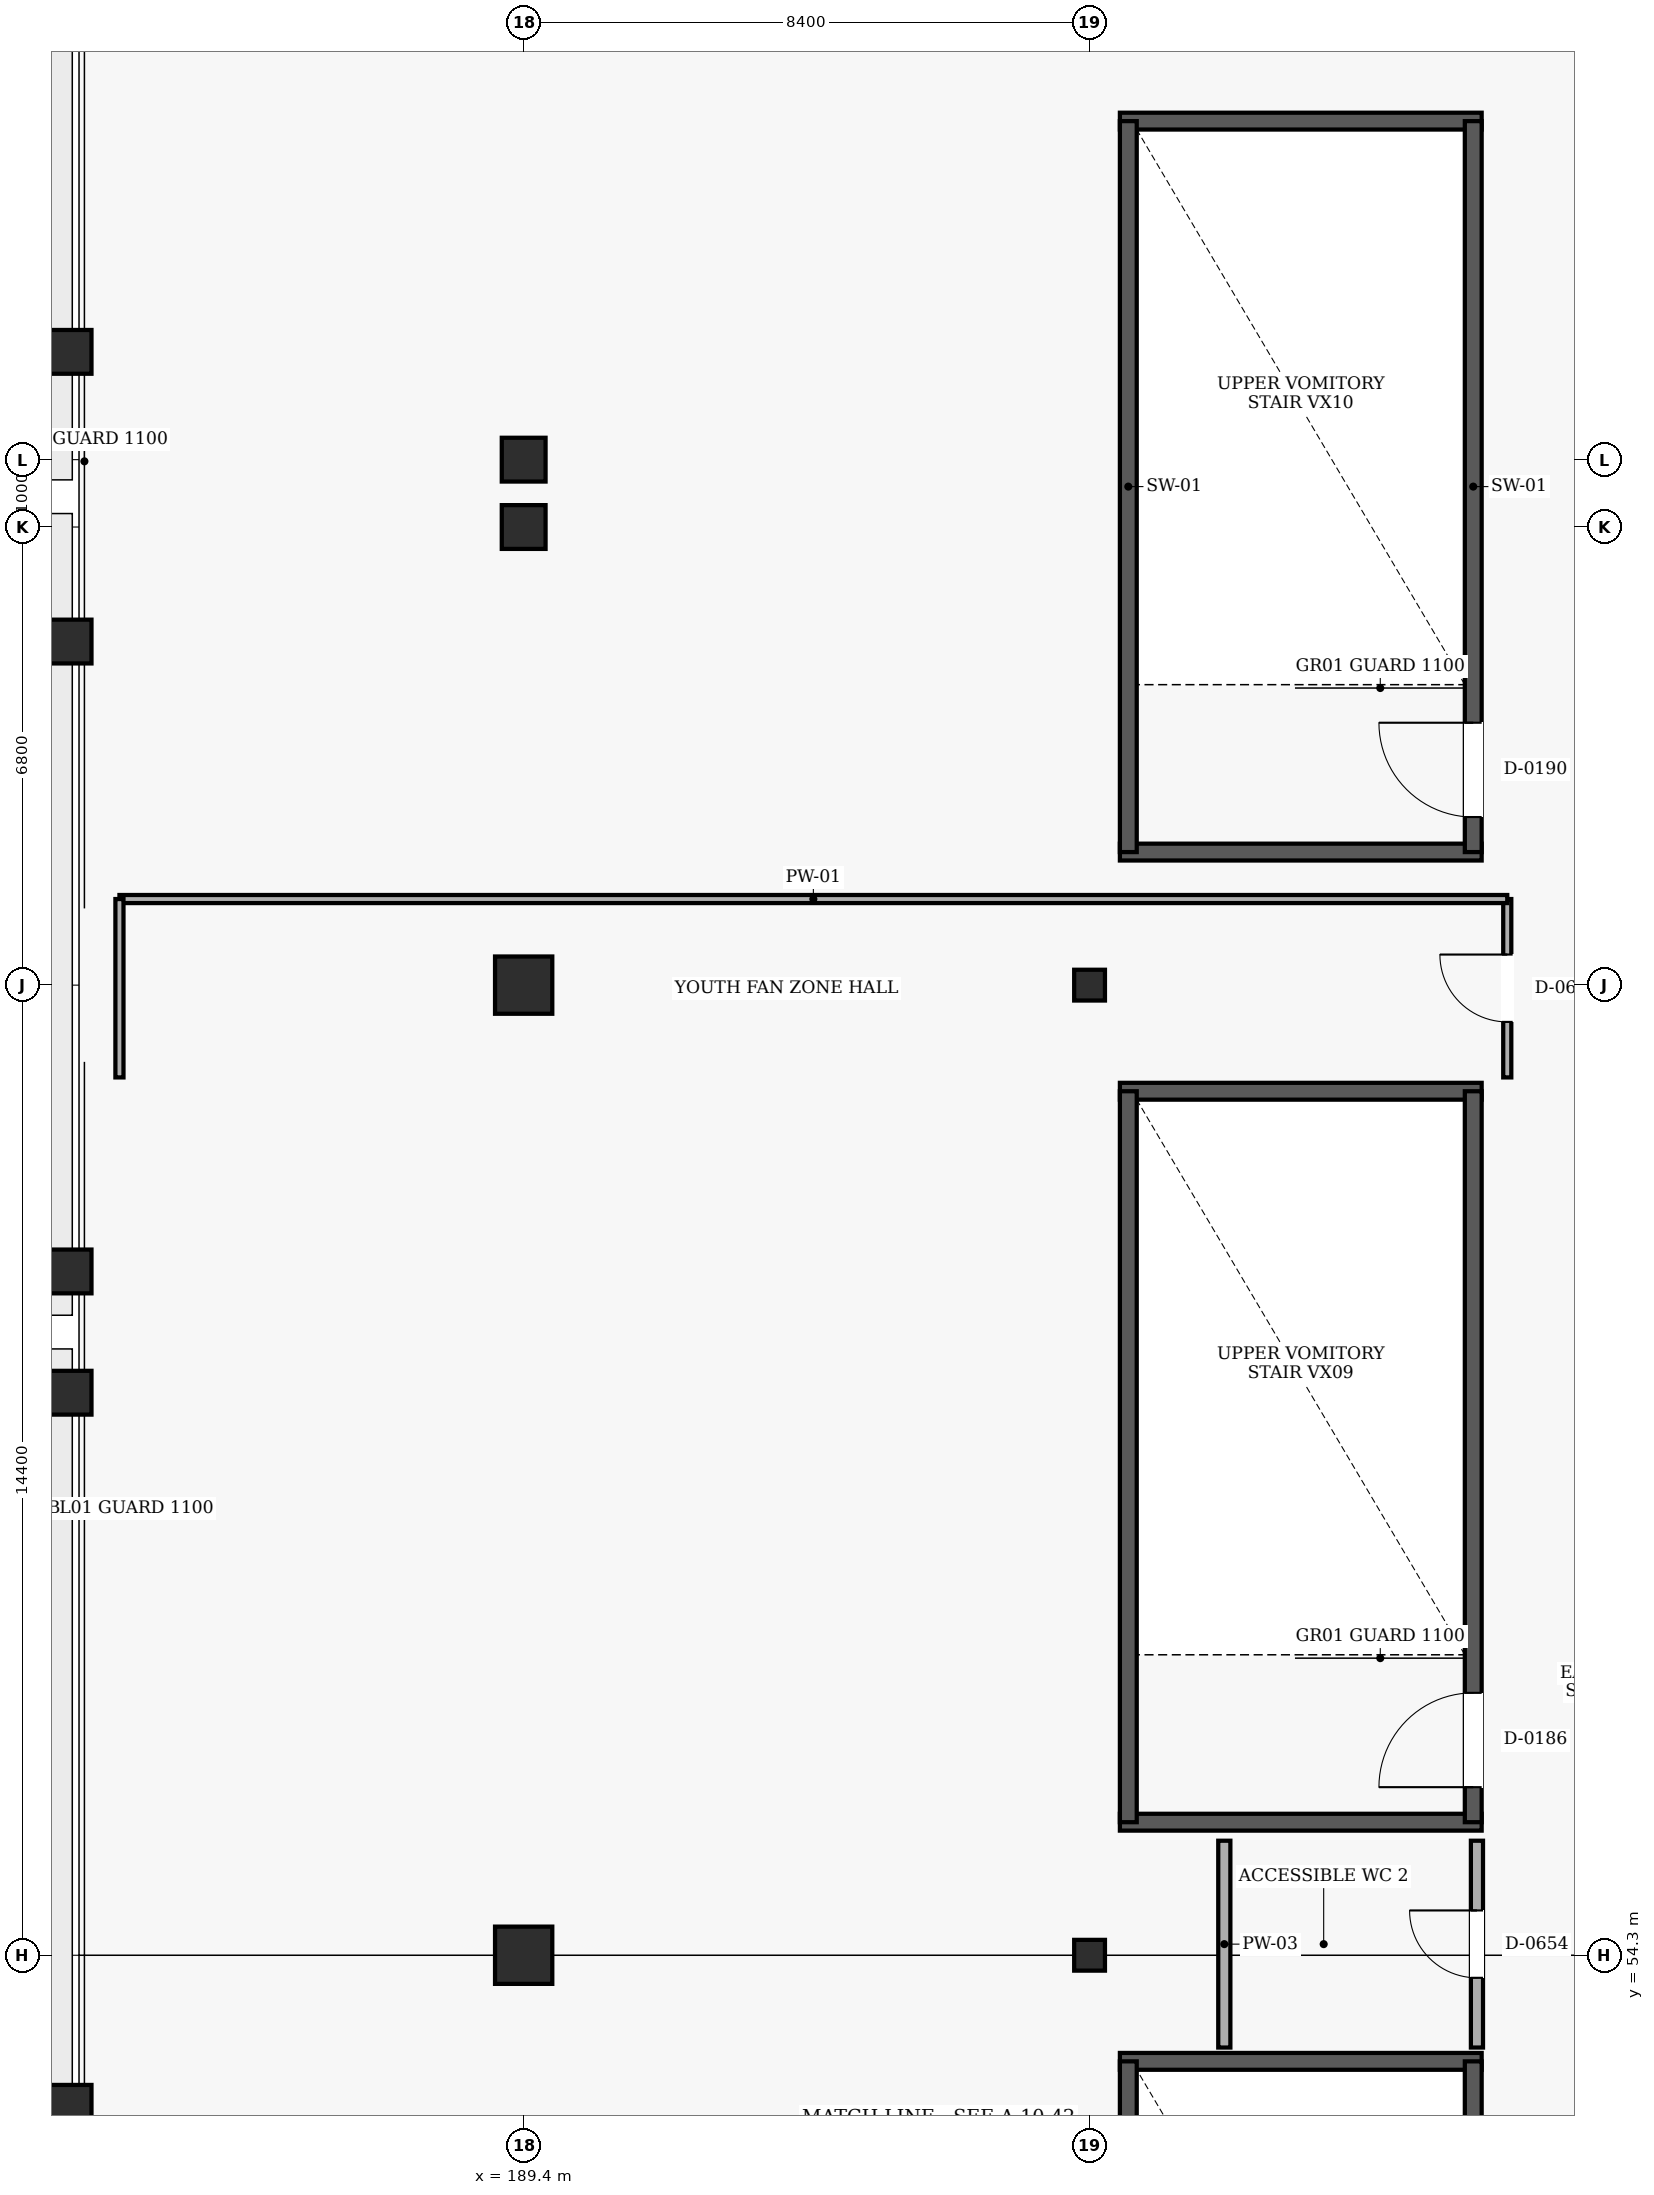
"""IFC4 building model, lengths in metres.
Left out: names, types, materials, properties, quantities, classifications, styles, units other than length and angle.
Written with IfcOpenShell. Run it as: python <this file> out.ifc"""

import sys

from ifc_helpers import new_model, si_unit, direction, frame, frame_2d, origin, origin_2d, place, context, subcontext, project, spatial, rectangle, hollow_circle, extrude, element, fill, save


model = new_model("IFC4")
c1 = context("Model", 3, precision=1e-05, world=origin(), true_north=direction((0.0, 1.0)))
c2 = subcontext(c1, "Body", "Model", "MODEL_VIEW")
j1 = project(units=[si_unit("LENGTHUNIT", "METRE"), si_unit("PLANEANGLEUNIT", "RADIAN")], contexts=[c1])
p1 = place(None, origin())
s1 = spatial("IfcSite", under=j1, at=p1, CompositionType="ELEMENT")
p2 = place(p1, origin())
s2 = spatial("IfcBuilding", under=s1, at=p2, CompositionType="ELEMENT")
p3 = place(p2, frame((0.0, 0.0, 15.0)))
s3 = spatial("IfcBuildingStorey", under=s2, at=p3, CompositionType="ELEMENT", Elevation=15.0)
for number, where, z_axis, x_axis in (
    (1, (189.4, 54.3, 0.0), (0.0, 0.0, 1.0), (1.0, 0.0, 0.0)),
    (2, (189.4, 68.7, 0.0), (0.0, 0.0, 1.0), (1.0, 0.0, 0.0)),
):
    element("IfcColumn", number, at=place(p3, frame(where, z_axis=z_axis, x_axis=x_axis)), inside=s3, PredefinedType="COLUMN", context=c2, shape_type="SweptSolid", body=[
        extrude(rectangle(XDim=0.85, YDim=0.85, at=origin_2d()), origin(), (0.0, 0.0, 1.0), 4.8),
    ])
for number, where, z_axis, x_axis in (
    (3, (189.4, 75.5, 0.0), (0.0, 0.0, 1.0), (1.0, 0.0, 0.0)),
    (4, (189.4, 76.5, 0.0), (0.0, 0.0, 1.0), (1.0, 0.0, 0.0)),
):
    element("IfcColumn", number, at=place(p3, frame(where, z_axis=z_axis, x_axis=x_axis)), inside=s3, PredefinedType="COLUMN", context=c2, shape_type="SweptSolid", body=[
        extrude(rectangle(XDim=0.65, YDim=0.65, at=origin_2d()), origin(), (0.0, 0.0, 1.0), 4.8),
    ])
for number, where, z_axis, x_axis in (
    (5, (197.8, 54.3, 0.0), (0.0, 0.0, 1.0), (1.0, 0.0, 0.0)),
    (6, (197.8, 68.7, 0.0), (0.0, 0.0, 1.0), (1.0, 0.0, 0.0)),
):
    element("IfcColumn", number, at=place(p3, frame(where, z_axis=z_axis, x_axis=x_axis)), inside=s3, PredefinedType="COLUMN", context=c2, shape_type="SweptSolid", body=[
        extrude(hollow_circle(Radius=0.229, WallThickness=0.02, at=origin_2d()), origin(), (0.0, 0.0, 1.0), 4.8),
    ])
for number, where, z_axis, x_axis in (
    (7, (182.66, 52.05, 0.0), (0.0, 0.0, 1.0), (1.0, 0.0, 0.0)),
    (8, (182.66, 62.65, 0.0), (0.0, 0.0, 1.0), (1.0, 0.0, 0.0)),
    (9, (182.66, 64.45, 0.0), (0.0, 0.0, 1.0), (1.0, 0.0, 0.0)),
    (10, (182.66, 73.8, 0.0), (0.0, 0.0, 1.0), (1.0, 0.0, 0.0)),
    (11, (182.66, 78.1, 0.0), (0.0, 0.0, 1.0), (1.0, 0.0, 0.0)),
):
    element("IfcColumn", number, at=place(p3, frame(where, z_axis=z_axis, x_axis=x_axis)), inside=s3, PredefinedType="COLUMN", context=c2, shape_type="SweptSolid", body=[
        extrude(rectangle(XDim=0.65, YDim=0.65, at=origin_2d()), origin(), (0.0, 0.0, 1.0), 2.188),
    ])
p4 = place(p3, frame((203.62, 52.725, 0.0), z_axis=(0.0, 0.0, 1.0), x_axis=(-1.0, 0.0, 0.0)))
e12 = element("IfcWall", 12, at=p4, inside=s3, PredefinedType="SHEAR", context=c2, shape_type="SweptSolid", body=[
    extrude(rectangle(XDim=5.37, YDim=0.25, at=frame_2d((2.685, 0.0))), origin(), (0.0, 0.0, 1.0), 4.5),
])
p5 = place(p3, frame((198.375, 41.875, 0.0), z_axis=(0.0, 0.0, 1.0), x_axis=(0.0, 1.0, 0.0)))
e13 = element("IfcWall", 13, at=p5, inside=s3, PredefinedType="SHEAR", context=c2, shape_type="SweptSolid", body=[
    extrude(rectangle(XDim=10.85, YDim=0.25, at=frame_2d((5.425, 0.0))), origin(), (0.0, 0.0, 1.0), 4.5),
])
p6 = place(p3, frame((203.495, 41.875, 0.0), z_axis=(0.0, 0.0, 1.0), x_axis=(0.0, 1.0, 0.0)))
e14 = element("IfcWall", 14, at=p6, inside=s3, PredefinedType="SHEAR", context=c2, shape_type="SweptSolid", body=[
    extrude(rectangle(XDim=10.85, YDim=0.25, at=frame_2d((5.425, 0.0))), origin(), (0.0, 0.0, 1.0), 4.5),
])
p7 = place(p6, frame((0.52, 0.0, 0.0)))
e15 = element("IfcOpeningElement", 15, at=p7, cuts=e14, PredefinedType="OPENING", context=c2, shape_type="SweptSolid", body=[
    extrude(rectangle(XDim=1.4, YDim=2.15, at=frame_2d((0.7, 1.075))), frame((0.0, 0.135, 0.0), z_axis=(0.0, -1.0, 0.0), x_axis=(1.0, 0.0, 0.0)), (0.0, 0.0, 1.0), 0.27),
])
for number, where, z_axis, x_axis in (
    (16, (198.25, 56.275, 0.0), (0.0, 0.0, 1.0), (1.0, 0.0, 0.0)),
    (17, (203.62, 67.125, 0.0), (0.0, 0.0, 1.0), (-1.0, 0.0, 0.0)),
):
    element("IfcWall", number, at=place(p3, frame(where, z_axis=z_axis, x_axis=x_axis)), inside=s3, PredefinedType="SHEAR", context=c2, shape_type="SweptSolid", body=[
        extrude(rectangle(XDim=5.37, YDim=0.25, at=frame_2d((2.685, 0.0))), origin(), (0.0, 0.0, 1.0), 4.5),
    ])
p8 = place(p3, frame((198.375, 56.275, 0.0), z_axis=(0.0, 0.0, 1.0), x_axis=(0.0, 1.0, 0.0)))
e18 = element("IfcWall", 18, at=p8, inside=s3, PredefinedType="SHEAR", context=c2, shape_type="SweptSolid", body=[
    extrude(rectangle(XDim=10.85, YDim=0.25, at=frame_2d((5.425, 0.0))), origin(), (0.0, 0.0, 1.0), 4.5),
])
p9 = place(p3, frame((203.495, 56.275, 0.0), z_axis=(0.0, 0.0, 1.0), x_axis=(0.0, 1.0, 0.0)))
e19 = element("IfcWall", 19, at=p9, inside=s3, PredefinedType="SHEAR", context=c2, shape_type="SweptSolid", body=[
    extrude(rectangle(XDim=10.85, YDim=0.25, at=frame_2d((5.425, 0.0))), origin(), (0.0, 0.0, 1.0), 4.5),
])
p10 = place(p9, frame((0.52, 0.0, 0.0)))
e20 = element("IfcOpeningElement", 20, at=p10, cuts=e19, PredefinedType="OPENING", context=c2, shape_type="SweptSolid", body=[
    extrude(rectangle(XDim=1.4, YDim=2.15, at=frame_2d((0.7, 1.075))), frame((0.0, 0.135, 0.0), z_axis=(0.0, -1.0, 0.0), x_axis=(1.0, 0.0, 0.0)), (0.0, 0.0, 1.0), 0.27),
])
for number, where, z_axis, x_axis in (
    (21, (198.25, 70.675, 0.0), (0.0, 0.0, 1.0), (1.0, 0.0, 0.0)),
    (22, (203.62, 81.525, 0.0), (0.0, 0.0, 1.0), (-1.0, 0.0, 0.0)),
):
    element("IfcWall", number, at=place(p3, frame(where, z_axis=z_axis, x_axis=x_axis)), inside=s3, PredefinedType="SHEAR", context=c2, shape_type="SweptSolid", body=[
        extrude(rectangle(XDim=5.37, YDim=0.25, at=frame_2d((2.685, 0.0))), origin(), (0.0, 0.0, 1.0), 4.5),
    ])
p11 = place(p3, frame((198.375, 70.675, 0.0), z_axis=(0.0, 0.0, 1.0), x_axis=(0.0, 1.0, 0.0)))
e23 = element("IfcWall", 23, at=p11, inside=s3, PredefinedType="SHEAR", context=c2, shape_type="SweptSolid", body=[
    extrude(rectangle(XDim=10.85, YDim=0.25, at=frame_2d((5.425, 0.0))), origin(), (0.0, 0.0, 1.0), 4.5),
])
p12 = place(p3, frame((203.495, 70.675, 0.0), z_axis=(0.0, 0.0, 1.0), x_axis=(0.0, 1.0, 0.0)))
e24 = element("IfcWall", 24, at=p12, inside=s3, PredefinedType="SHEAR", context=c2, shape_type="SweptSolid", body=[
    extrude(rectangle(XDim=10.85, YDim=0.25, at=frame_2d((5.425, 0.0))), origin(), (0.0, 0.0, 1.0), 4.5),
])
p13 = place(p12, frame((0.52, 0.0, 0.0)))
e25 = element("IfcOpeningElement", 25, at=p13, cuts=e24, PredefinedType="OPENING", context=c2, shape_type="SweptSolid", body=[
    extrude(rectangle(XDim=1.4, YDim=2.15, at=frame_2d((0.7, 1.075))), frame((0.0, 0.135, 0.0), z_axis=(0.0, -1.0, 0.0), x_axis=(1.0, 0.0, 0.0)), (0.0, 0.0, 1.0), 0.27),
])
p14 = place(p3, frame((203.55, 52.93, 0.0), z_axis=(0.0, 0.0, 1.0), x_axis=(0.0, 1.0, 0.0)))
e26 = element("IfcWall", 26, at=p14, inside=s3, PredefinedType="PARTITIONING", context=c2, shape_type="SweptSolid", body=[
    extrude(rectangle(XDim=3.07, YDim=0.18, at=frame_2d((1.535, 0.0))), origin(), (0.0, 0.0, 1.0), 4.5),
])
p15 = place(p14, frame((1.035, 0.0, 0.0)))
e27 = element("IfcOpeningElement", 27, at=p15, cuts=e26, PredefinedType="OPENING", context=c2, shape_type="SweptSolid", body=[
    extrude(rectangle(XDim=1.0, YDim=2.1, at=frame_2d((0.5, 1.05))), frame((0.0, 0.1, 0.0), z_axis=(0.0, -1.0, 0.0), x_axis=(1.0, 0.0, 0.0)), (0.0, 0.0, 1.0), 0.2),
])
p16 = place(p3, frame((199.8, 56.0, 0.0), z_axis=(0.0, 0.0, 1.0), x_axis=(0.0, -1.0, 0.0)))
e28 = element("IfcWall", 28, at=p16, inside=s3, PredefinedType="PARTITIONING", context=c2, shape_type="SweptSolid", body=[
    extrude(rectangle(XDim=3.07, YDim=0.18, at=frame_2d((1.535, 0.0))), origin(), (0.0, 0.0, 1.0), 4.5),
])
p17 = place(p3, frame((204.0, 67.33, 0.0), z_axis=(0.0, 0.0, 1.0), x_axis=(0.0, 1.0, 0.0)))
e29 = element("IfcWall", 29, at=p17, inside=s3, PredefinedType="PARTITIONING", context=c2, shape_type="SweptSolid", body=[
    extrude(rectangle(XDim=2.648, YDim=0.12, at=frame_2d((1.324, 0.0))), origin(), (0.0, 0.0, 1.0), 4.5),
])
p18 = place(p17, frame((0.824, 0.0, 0.0)))
e30 = element("IfcOpeningElement", 30, at=p18, cuts=e29, PredefinedType="OPENING", context=c2, shape_type="SweptSolid", body=[
    extrude(rectangle(XDim=1.0, YDim=2.1, at=frame_2d((0.5, 1.05))), frame((0.0, 0.07, 0.0), z_axis=(0.0, -1.0, 0.0), x_axis=(1.0, 0.0, 0.0)), (0.0, 0.0, 1.0), 0.14),
])
p19 = place(p3, frame((204.0, 69.978, 0.0), z_axis=(0.0, 0.0, 1.0), x_axis=(-1.0, 0.0, 0.0)))
e31 = element("IfcWall", 31, at=p19, inside=s3, PredefinedType="PARTITIONING", context=c2, shape_type="SweptSolid", body=[
    extrude(rectangle(XDim=20.6, YDim=0.12, at=frame_2d((10.3, 0.0))), origin(), (0.0, 0.0, 1.0), 4.5),
])
p20 = place(p3, frame((183.4, 69.978, 0.0), z_axis=(0.0, 0.0, 1.0), x_axis=(0.0, -1.0, 0.0)))
e32 = element("IfcWall", 32, at=p20, inside=s3, PredefinedType="PARTITIONING", context=c2, shape_type="SweptSolid", body=[
    extrude(rectangle(XDim=2.648, YDim=0.12, at=frame_2d((1.324, 0.0))), origin(), (0.0, 0.0, 1.0), 4.5),
])
p21 = place(p10, origin())
e33 = element("IfcDoor", 33, at=p21, inside=s3, OperationType="SINGLE_SWING_LEFT", PredefinedType="DOOR", context=c2, shape_type="SweptSolid", body=[
    extrude(rectangle(XDim=1.4, YDim=2.15, at=frame_2d((0.7, 1.075))), frame((0.0, 0.025, 0.0), z_axis=(0.0, -1.0, 0.0), x_axis=(1.0, 0.0, 0.0)), (0.0, 0.0, 1.0), 0.05),
])
fill(e20, e33)
p22 = place(p13, origin())
e34 = element("IfcDoor", 34, at=p22, inside=s3, OperationType="SINGLE_SWING_RIGHT", PredefinedType="DOOR", context=c2, shape_type="SweptSolid", body=[
    extrude(rectangle(XDim=1.4, YDim=2.15, at=frame_2d((0.7, 1.075))), frame((0.0, 0.025, 0.0), z_axis=(0.0, -1.0, 0.0), x_axis=(1.0, 0.0, 0.0)), (0.0, 0.0, 1.0), 0.05),
])
fill(e25, e34)
p23 = place(p15, origin())
e35 = element("IfcDoor", 35, at=p23, inside=s3, OperationType="SINGLE_SWING_RIGHT", PredefinedType="DOOR", context=c2, shape_type="SweptSolid", body=[
    extrude(rectangle(XDim=1.0, YDim=2.1, at=frame_2d((0.5, 1.05))), frame((0.0, 0.025, 0.0), z_axis=(0.0, -1.0, 0.0), x_axis=(1.0, 0.0, 0.0)), (0.0, 0.0, 1.0), 0.05),
])
fill(e27, e35)
p24 = place(p18, origin())
e36 = element("IfcDoor", 36, at=p24, inside=s3, OperationType="SINGLE_SWING_RIGHT", PredefinedType="DOOR", context=c2, shape_type="SweptSolid", body=[
    extrude(rectangle(XDim=1.0, YDim=2.1, at=frame_2d((0.5, 1.05))), frame((0.0, 0.025, 0.0), z_axis=(0.0, -1.0, 0.0), x_axis=(1.0, 0.0, 0.0)), (0.0, 0.0, 1.0), 0.05),
])
fill(e30, e36)
save(model, sys.argv[1])
